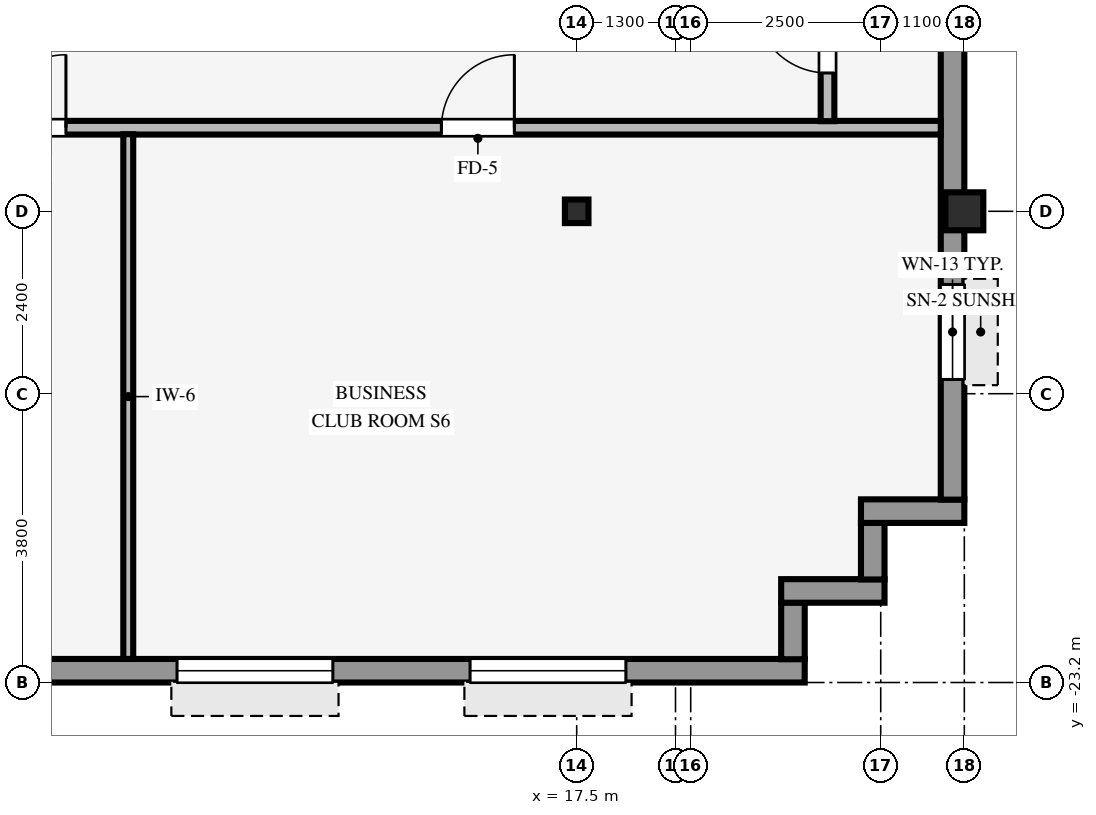
"""IFC4 building model, lengths in metres.
Left out: names, types, materials, properties, quantities, classifications, styles, units other than length and angle.
Written with IfcOpenShell. Run it as: python <this file> out.ifc"""

import sys

from ifc_helpers import new_model, si_unit, direction, frame, frame_2d, origin, origin_2d, place, context, subcontext, project, spatial, rectangle, hollow_rectangle, i_section, extrude, source, transform, mapped, element, fill, save


model = new_model("IFC4")
c1 = context("Model", 3, precision=1e-05, world=origin(), true_north=direction((0.0, 1.0)))
c2 = subcontext(c1, "Body", "Model", "MODEL_VIEW")
j1 = project(units=[si_unit("LENGTHUNIT", "METRE"), si_unit("PLANEANGLEUNIT", "RADIAN")], contexts=[c1])
p1 = place(None, origin())
s1 = spatial("IfcSite", under=j1, at=p1, CompositionType="ELEMENT")
p2 = place(p1, origin())
s2 = spatial("IfcBuilding", under=s1, at=p2, CompositionType="ELEMENT")
p3 = place(p2, frame((0.0, 0.0, 190.9)))
s3 = spatial("IfcBuildingStorey", under=s2, at=p3, CompositionType="ELEMENT", Elevation=190.9)
p4 = place(p3, frame((22.6, -17.0, 0.0), z_axis=(0.0, 0.0, 1.0), x_axis=(1.0, 0.0, 0.0)))
e1 = element("IfcColumn", 1, at=p4, inside=s3, PredefinedType="COLUMN", context=c2, shape_type="SweptSolid", body=[
    extrude(hollow_rectangle(XDim=0.5, YDim=0.5, WallThickness=0.032, InnerFilletRadius=0.032, OuterFilletRadius=0.064, at=origin_2d()), origin(), (0.0, 0.0, 1.0), 3.37),
])
p5 = place(p3, frame((17.5, -17.0, 0.0), z_axis=(0.0, 0.0, 1.0), x_axis=(1.0, 0.0, 0.0)))
e2 = element("IfcColumn", 2, at=p5, inside=s3, PredefinedType="COLUMN", context=c2, shape_type="SweptSolid", body=[
    extrude(i_section(OverallWidth=0.31, OverallDepth=0.31, WebThickness=0.015, FlangeThickness=0.015, FilletRadius=0.015, at=origin_2d()), origin(), (0.0, 0.0, 1.0), 3.37),
])
p6 = place(p3, frame((-24.3, -23.045, 0.0), z_axis=(0.0, 0.0, 1.0), x_axis=(1.0, 0.0, 0.0)))
e3 = element("IfcWall", 3, at=p6, inside=s3, PredefinedType="STANDARD", context=c2, shape_type="SweptSolid", body=[
    extrude(rectangle(XDim=44.8, YDim=0.31, at=frame_2d((22.4, 0.0))), origin(), (0.0, 0.0, 1.0), 2.705),
])
p7 = place(p6, frame((2.353, 0.0, 0.8)))
e4 = element("IfcOpeningElement", 4, at=p7, cuts=e3, PredefinedType="OPENING", context=c2, shape_type="SweptSolid", body=[
    extrude(rectangle(XDim=2.05, YDim=1.52, at=frame_2d((1.025, 0.76))), frame((0.0, 0.165, 0.0), z_axis=(0.0, -1.0, 0.0), x_axis=(1.0, 0.0, 0.0)), (0.0, 0.0, 1.0), 0.33),
])
p8 = place(p6, frame((7.108, 0.0, 0.8)))
e5 = element("IfcOpeningElement", 5, at=p8, cuts=e3, PredefinedType="OPENING", context=c2, shape_type="SweptSolid", body=[
    extrude(rectangle(XDim=2.05, YDim=1.52, at=frame_2d((1.025, 0.76))), frame((0.0, 0.165, 0.0), z_axis=(0.0, -1.0, 0.0), x_axis=(1.0, 0.0, 0.0)), (0.0, 0.0, 1.0), 0.33),
])
p9 = place(p6, frame((16.619, 0.0, 0.8)))
e6 = element("IfcOpeningElement", 6, at=p9, cuts=e3, PredefinedType="OPENING", context=c2, shape_type="SweptSolid", body=[
    extrude(rectangle(XDim=2.05, YDim=1.52, at=frame_2d((1.025, 0.76))), frame((0.0, 0.165, 0.0), z_axis=(0.0, -1.0, 0.0), x_axis=(1.0, 0.0, 0.0)), (0.0, 0.0, 1.0), 0.33),
])
p10 = place(p6, frame((21.375, 0.0, 0.8)))
e7 = element("IfcOpeningElement", 7, at=p10, cuts=e3, PredefinedType="OPENING", context=c2, shape_type="SweptSolid", body=[
    extrude(rectangle(XDim=2.05, YDim=1.52, at=frame_2d((1.025, 0.76))), frame((0.0, 0.165, 0.0), z_axis=(0.0, -1.0, 0.0), x_axis=(1.0, 0.0, 0.0)), (0.0, 0.0, 1.0), 0.33),
])
p11 = place(p6, frame((26.131, 0.0, 0.8)))
e8 = element("IfcOpeningElement", 8, at=p11, cuts=e3, PredefinedType="OPENING", context=c2, shape_type="SweptSolid", body=[
    extrude(rectangle(XDim=2.05, YDim=1.52, at=frame_2d((1.025, 0.76))), frame((0.0, 0.165, 0.0), z_axis=(0.0, -1.0, 0.0), x_axis=(1.0, 0.0, 0.0)), (0.0, 0.0, 1.0), 0.33),
])
p12 = place(p6, frame((30.436, 0.0, 0.8)))
e9 = element("IfcOpeningElement", 9, at=p12, cuts=e3, PredefinedType="OPENING", context=c2, shape_type="SweptSolid", body=[
    extrude(rectangle(XDim=2.05, YDim=1.52, at=frame_2d((1.025, 0.76))), frame((0.0, 0.165, 0.0), z_axis=(0.0, -1.0, 0.0), x_axis=(1.0, 0.0, 0.0)), (0.0, 0.0, 1.0), 0.33),
])
p13 = place(p6, frame((36.542, 0.0, 0.8)))
e10 = element("IfcOpeningElement", 10, at=p13, cuts=e3, PredefinedType="OPENING", context=c2, shape_type="SweptSolid", body=[
    extrude(rectangle(XDim=2.05, YDim=1.52, at=frame_2d((1.025, 0.76))), frame((0.0, 0.165, 0.0), z_axis=(0.0, -1.0, 0.0), x_axis=(1.0, 0.0, 0.0)), (0.0, 0.0, 1.0), 0.33),
])
p14 = place(p6, frame((40.397, 0.0, 0.8)))
e11 = element("IfcOpeningElement", 11, at=p14, cuts=e3, PredefinedType="OPENING", context=c2, shape_type="SweptSolid", body=[
    extrude(rectangle(XDim=2.05, YDim=1.52, at=frame_2d((1.025, 0.76))), frame((0.0, 0.165, 0.0), z_axis=(0.0, -1.0, 0.0), x_axis=(1.0, 0.0, 0.0)), (0.0, 0.0, 1.0), 0.33),
])
p15 = place(p3, frame((20.345, -22.894, 0.0), z_axis=(0.0, 0.0, 1.0), x_axis=(0.0, 1.0, 0.0)))
e12 = element("IfcWall", 12, at=p15, inside=s3, PredefinedType="STANDARD", context=c2, shape_type="SweptSolid", body=[
    extrude(rectangle(XDim=0.748, YDim=0.31, at=frame_2d((0.374, 0.0))), origin(), (0.0, 0.0, 1.0), 3.36),
])
p16 = place(p3, frame((20.19, -21.995, 0.0), z_axis=(0.0, 0.0, 1.0), x_axis=(1.0, 0.0, 0.0)))
e13 = element("IfcWall", 13, at=p16, inside=s3, PredefinedType="STANDARD", context=c2, shape_type="SweptSolid", body=[
    extrude(rectangle(XDim=1.36, YDim=0.31, at=frame_2d((0.68, 0.0))), origin(), (0.0, 0.0, 1.0), 3.36),
])
p17 = place(p3, frame((21.395, -21.844, 0.0), z_axis=(0.0, 0.0, 1.0), x_axis=(0.0, 1.0, 0.0)))
e14 = element("IfcWall", 14, at=p17, inside=s3, PredefinedType="STANDARD", context=c2, shape_type="SweptSolid", body=[
    extrude(rectangle(XDim=0.748, YDim=0.31, at=frame_2d((0.374, 0.0))), origin(), (0.0, 0.0, 1.0), 3.36),
])
p18 = place(p3, frame((21.24, -20.945, 0.0), z_axis=(0.0, 0.0, 1.0), x_axis=(1.0, 0.0, 0.0)))
e15 = element("IfcWall", 15, at=p18, inside=s3, PredefinedType="STANDARD", context=c2, shape_type="SweptSolid", body=[
    extrude(rectangle(XDim=1.36, YDim=0.31, at=frame_2d((0.68, 0.0))), origin(), (0.0, 0.0, 1.0), 3.36),
])
p19 = place(p3, frame((22.445, -20.794, 0.0), z_axis=(0.0, 0.0, 1.0), x_axis=(0.0, 1.0, 0.0)))
e16 = element("IfcWall", 16, at=p19, inside=s3, PredefinedType="STANDARD", context=c2, shape_type="SweptSolid", body=[
    extrude(rectangle(XDim=37.788, YDim=0.31, at=frame_2d((18.894, 0.0))), origin(), (0.0, 0.0, 1.0), 2.705),
])
p20 = place(p19, frame((16.474, 0.0, 0.0), z_axis=(0.0, 0.0, 1.0), x_axis=(-1.0, 0.0, 0.0)))
e17 = element("IfcOpeningElement", 17, at=p20, cuts=e16, PredefinedType="OPENING", context=c2, shape_type="SweptSolid", body=[
    extrude(rectangle(XDim=0.98, YDim=2.15, at=frame_2d((0.49, 1.075))), frame((0.0, 0.165, 0.0), z_axis=(0.0, -1.0, 0.0), x_axis=(1.0, 0.0, 0.0)), (0.0, 0.0, 1.0), 0.33),
])
p21 = place(p19, frame((1.581, 0.0, 0.8)))
e18 = element("IfcOpeningElement", 18, at=p21, cuts=e16, PredefinedType="OPENING", context=c2, shape_type="SweptSolid", body=[
    extrude(rectangle(XDim=1.25, YDim=1.52, at=frame_2d((0.625, 0.76))), frame((0.0, 0.165, 0.0), z_axis=(0.0, -1.0, 0.0), x_axis=(1.0, 0.0, 0.0)), (0.0, 0.0, 1.0), 0.33),
])
p22 = place(p19, frame((8.044, 0.0, 0.8)))
e19 = element("IfcOpeningElement", 19, at=p22, cuts=e16, PredefinedType="OPENING", context=c2, shape_type="SweptSolid", body=[
    extrude(rectangle(XDim=1.25, YDim=1.52, at=frame_2d((0.625, 0.76))), frame((0.0, 0.165, 0.0), z_axis=(0.0, -1.0, 0.0), x_axis=(1.0, 0.0, 0.0)), (0.0, 0.0, 1.0), 0.33),
])
p23 = place(p19, frame((13.156, 0.0, 0.8)))
e20 = element("IfcOpeningElement", 20, at=p23, cuts=e16, PredefinedType="OPENING", context=c2, shape_type="SweptSolid", body=[
    extrude(rectangle(XDim=1.25, YDim=1.52, at=frame_2d((0.625, 0.76))), frame((0.0, 0.165, 0.0), z_axis=(0.0, -1.0, 0.0), x_axis=(1.0, 0.0, 0.0)), (0.0, 0.0, 1.0), 0.33),
])
p24 = place(p19, frame((18.269, 0.0, 0.8)))
e21 = element("IfcOpeningElement", 21, at=p24, cuts=e16, PredefinedType="OPENING", context=c2, shape_type="SweptSolid", body=[
    extrude(rectangle(XDim=1.25, YDim=1.52, at=frame_2d((0.625, 0.76))), frame((0.0, 0.165, 0.0), z_axis=(0.0, -1.0, 0.0), x_axis=(1.0, 0.0, 0.0)), (0.0, 0.0, 1.0), 0.33),
])
p25 = place(p19, frame((22.482, 0.0, 0.8)))
e22 = element("IfcOpeningElement", 22, at=p25, cuts=e16, PredefinedType="OPENING", context=c2, shape_type="SweptSolid", body=[
    extrude(rectangle(XDim=1.25, YDim=1.52, at=frame_2d((0.625, 0.76))), frame((0.0, 0.165, 0.0), z_axis=(0.0, -1.0, 0.0), x_axis=(1.0, 0.0, 0.0)), (0.0, 0.0, 1.0), 0.33),
])
p26 = place(p19, frame((28.044, 0.0, 0.8)))
e23 = element("IfcOpeningElement", 23, at=p26, cuts=e16, PredefinedType="OPENING", context=c2, shape_type="SweptSolid", body=[
    extrude(rectangle(XDim=1.25, YDim=1.52, at=frame_2d((0.625, 0.76))), frame((0.0, 0.165, 0.0), z_axis=(0.0, -1.0, 0.0), x_axis=(1.0, 0.0, 0.0)), (0.0, 0.0, 1.0), 0.33),
])
p27 = place(p19, frame((33.607, 0.0, 0.8)))
e24 = element("IfcOpeningElement", 24, at=p27, cuts=e16, PredefinedType="OPENING", context=c2, shape_type="SweptSolid", body=[
    extrude(rectangle(XDim=1.25, YDim=1.52, at=frame_2d((0.625, 0.76))), frame((0.0, 0.165, 0.0), z_axis=(0.0, -1.0, 0.0), x_axis=(1.0, 0.0, 0.0)), (0.0, 0.0, 1.0), 0.33),
])
p28 = place(p3, frame((-26.09, -15.9, 0.0), z_axis=(0.0, 0.0, 1.0), x_axis=(1.0, 0.0, 0.0)))
e25 = element("IfcWall", 25, at=p28, inside=s3, PredefinedType="PARTITIONING", context=c2, shape_type="SweptSolid", body=[
    extrude(rectangle(XDim=48.38, YDim=0.18, at=frame_2d((24.19, 0.0))), origin(), (0.0, 0.0, 1.0), 3.36),
])
p29 = place(p28, frame((41.81, 0.0, 0.0)))
e26 = element("IfcOpeningElement", 26, at=p29, cuts=e25, PredefinedType="OPENING", context=c2, shape_type="SweptSolid", body=[
    extrude(rectangle(XDim=0.96, YDim=2.1, at=frame_2d((0.48, 1.05))), frame((0.0, 0.1, 0.0), z_axis=(0.0, -1.0, 0.0), x_axis=(1.0, 0.0, 0.0)), (0.0, 0.0, 1.0), 0.2),
])
p30 = place(p28, frame((17.985, 0.0, 0.0)))
e27 = element("IfcOpeningElement", 27, at=p30, cuts=e25, PredefinedType="OPENING", context=c2, shape_type="SweptSolid", body=[
    extrude(rectangle(XDim=0.96, YDim=2.1, at=frame_2d((0.48, 1.05))), frame((0.0, 0.1, 0.0), z_axis=(0.0, -1.0, 0.0), x_axis=(1.0, 0.0, 0.0)), (0.0, 0.0, 1.0), 0.2),
])
p31 = place(p28, frame((26.55, 0.0, 0.0)))
e28 = element("IfcOpeningElement", 28, at=p31, cuts=e25, PredefinedType="OPENING", context=c2, shape_type="SweptSolid", body=[
    extrude(rectangle(XDim=0.96, YDim=2.1, at=frame_2d((0.48, 1.05))), frame((0.0, 0.1, 0.0), z_axis=(0.0, -1.0, 0.0), x_axis=(1.0, 0.0, 0.0)), (0.0, 0.0, 1.0), 0.2),
])
p32 = place(p28, frame((10.935, 0.0, 0.0)))
e29 = element("IfcOpeningElement", 29, at=p32, cuts=e25, PredefinedType="OPENING", context=c2, shape_type="SweptSolid", body=[
    extrude(rectangle(XDim=0.96, YDim=2.1, at=frame_2d((0.48, 1.05))), frame((0.0, 0.1, 0.0), z_axis=(0.0, -1.0, 0.0), x_axis=(1.0, 0.0, 0.0)), (0.0, 0.0, 1.0), 0.2),
])
p33 = place(p28, frame((35.91, 0.0, 0.0)))
e30 = element("IfcOpeningElement", 30, at=p33, cuts=e25, PredefinedType="OPENING", context=c2, shape_type="SweptSolid", body=[
    extrude(rectangle(XDim=0.96, YDim=2.1, at=frame_2d((0.48, 1.05))), frame((0.0, 0.1, 0.0), z_axis=(0.0, -1.0, 0.0), x_axis=(1.0, 0.0, 0.0)), (0.0, 0.0, 1.0), 0.2),
])
p34 = place(p28, frame((2.465, 0.0, 0.0)))
e31 = element("IfcOpeningElement", 31, at=p34, cuts=e25, PredefinedType="OPENING", context=c2, shape_type="SweptSolid", body=[
    extrude(rectangle(XDim=0.96, YDim=2.1, at=frame_2d((0.48, 1.05))), frame((0.0, 0.1, 0.0), z_axis=(0.0, -1.0, 0.0), x_axis=(1.0, 0.0, 0.0)), (0.0, 0.0, 1.0), 0.2),
])
p35 = place(p3, frame((11.6, -22.89, 0.0), z_axis=(0.0, 0.0, 1.0), x_axis=(0.0, 1.0, 0.0)))
e32 = element("IfcWall", 32, at=p35, inside=s3, PredefinedType="PARTITIONING", context=c2, shape_type="SweptSolid", body=[
    extrude(rectangle(XDim=6.904, YDim=0.13, at=frame_2d((3.452, 0.0))), origin(), (0.0, 0.0, 1.0), 3.36),
])
p36 = place(p3, frame((20.8, -15.814, 0.0), z_axis=(0.0, 0.0, 1.0), x_axis=(0.0, 1.0, 0.0)))
e33 = element("IfcWall", 33, at=p36, inside=s3, PredefinedType="PARTITIONING", context=c2, shape_type="SweptSolid", body=[
    extrude(rectangle(XDim=2.228, YDim=0.18, at=frame_2d((1.114, 0.0))), origin(), (0.0, 0.0, 1.0), 3.36),
])
p37 = place(p36, frame((0.634, 0.0, 0.0)))
e34 = element("IfcOpeningElement", 34, at=p37, cuts=e33, PredefinedType="OPENING", context=c2, shape_type="SweptSolid", body=[
    extrude(rectangle(XDim=0.96, YDim=2.1, at=frame_2d((0.48, 1.05))), frame((0.0, 0.1, 0.0), z_axis=(0.0, -1.0, 0.0), x_axis=(1.0, 0.0, 0.0)), (0.0, 0.0, 1.0), 0.2),
])
m1 = source(origin(), c2, "Body", "SweptSolid", [
    extrude(rectangle(XDim=2.05, YDim=1.52, at=frame_2d((1.025, 0.76))), frame((0.0, 0.03, 0.0), z_axis=(0.0, -1.0, 0.0), x_axis=(1.0, 0.0, 0.0)), (0.0, 0.0, 1.0), 0.06),
])
p38 = place(p13, origin())
e35 = element("IfcWindow", 35, at=p38, inside=s3, PartitioningType="SINGLE_PANEL", PredefinedType="WINDOW", context=c2, shape_type="MappedRepresentation", body=[
    mapped(m1, transform((0.0, 0.0, 0.0), scale=1.0)),
])
fill(e10, e35)
p39 = place(p14, origin())
e36 = element("IfcWindow", 36, at=p39, inside=s3, PartitioningType="SINGLE_PANEL", PredefinedType="WINDOW", context=c2, shape_type="MappedRepresentation", body=[
    mapped(m1, transform((0.0, 0.0, 0.0), scale=1.0)),
])
fill(e11, e36)
m2 = source(origin(), c2, "Body", "SweptSolid", [
    extrude(rectangle(XDim=1.25, YDim=1.52, at=frame_2d((0.625, 0.76))), frame((0.0, 0.03, 0.0), z_axis=(0.0, -1.0, 0.0), x_axis=(1.0, 0.0, 0.0)), (0.0, 0.0, 1.0), 0.06),
])
p40 = place(p21, origin())
e37 = element("IfcWindow", 37, at=p40, inside=s3, PartitioningType="SINGLE_PANEL", PredefinedType="WINDOW", context=c2, shape_type="MappedRepresentation", body=[
    mapped(m2, transform((0.0, 0.0, 0.0), scale=1.0)),
])
fill(e18, e37)
m3 = source(origin(), c2, "Body", "SweptSolid", [
    extrude(rectangle(XDim=0.96, YDim=2.1, at=frame_2d((0.48, 1.05))), frame((0.0, 0.025, 0.0), z_axis=(0.0, -1.0, 0.0), x_axis=(1.0, 0.0, 0.0)), (0.0, 0.0, 1.0), 0.05),
])
p41 = place(p29, origin())
e38 = element("IfcDoor", 38, at=p41, inside=s3, OperationType="SINGLE_SWING_RIGHT", PredefinedType="DOOR", context=c2, shape_type="MappedRepresentation", body=[
    mapped(m3, transform((0.0, 0.0, 0.0), scale=1.0)),
])
fill(e26, e38)
p42 = place(p33, origin())
e39 = element("IfcDoor", 39, at=p42, inside=s3, OperationType="SINGLE_SWING_RIGHT", PredefinedType="DOOR", context=c2, shape_type="MappedRepresentation", body=[
    mapped(m3, transform((0.0, 0.0, 0.0), scale=1.0)),
])
fill(e30, e39)
p43 = place(p37, origin())
e40 = element("IfcDoor", 40, at=p43, inside=s3, OperationType="SINGLE_SWING_RIGHT", PredefinedType="DOOR", context=c2, shape_type="MappedRepresentation", body=[
    mapped(m3, transform((0.0, 0.0, 0.0), scale=1.0)),
])
fill(e34, e40)
save(model, sys.argv[1])
